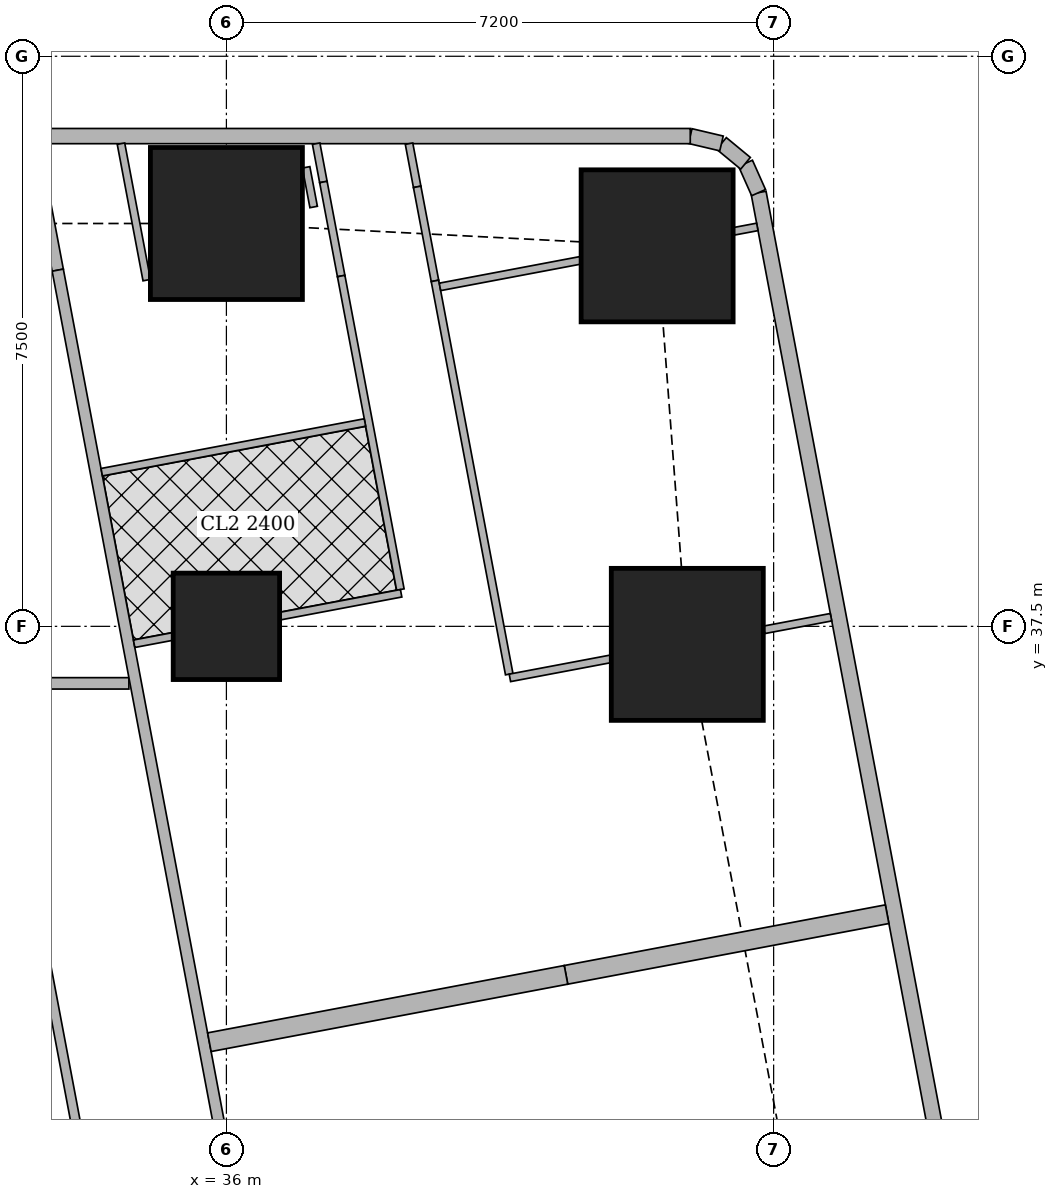
"""IFC4 building model, lengths in metres.
Left out: names, types, materials, properties, quantities, classifications, styles, units other than length and angle.
Written with IfcOpenShell. Run it as: python <this file> out.ifc"""

import sys

from ifc_helpers import new_model, si_unit, direction, frame, frame_2d, origin, origin_2d, place, context, subcontext, project, spatial, rectangle, extrude, element, fill, save


model = new_model("IFC4")
c1 = context("Model", 3, precision=1e-05, world=origin(), true_north=direction((0.0, 1.0)))
c2 = subcontext(c1, "Body", "Model", "MODEL_VIEW")
j1 = project(units=[si_unit("LENGTHUNIT", "METRE"), si_unit("PLANEANGLEUNIT", "RADIAN")], contexts=[c1])
p1 = place(None, origin())
s1 = spatial("IfcSite", under=j1, at=p1, CompositionType="ELEMENT")
p2 = place(p1, origin())
s2 = spatial("IfcBuilding", under=s1, at=p2, CompositionType="ELEMENT")
p3 = place(p2, frame((0.0, 0.0, 251.6)))
s3 = spatial("IfcBuildingStorey", under=s2, at=p3, CompositionType="ELEMENT", Elevation=251.6)
p4 = place(p3, frame((36.0, 37.5, 0.0), z_axis=(0.0, 0.0, 1.0), x_axis=(1.0, 0.0, 0.0)))
e1 = element("IfcColumn", 1, at=p4, inside=s3, PredefinedType="COLUMN", context=c2, shape_type="SweptSolid", body=[
    extrude(rectangle(XDim=1.4, YDim=1.4, at=origin_2d()), origin(), (0.0, 0.0, 1.0), 3.75),
])
p5 = place(p3, frame((42.064, 37.263, 0.0), z_axis=(0.0, 0.0, 1.0), x_axis=(1.0, 0.0, 0.0)))
e2 = element("IfcColumn", 2, at=p5, inside=s3, PredefinedType="COLUMN", context=c2, shape_type="SweptSolid", body=[
    extrude(rectangle(XDim=2.0, YDim=2.0, at=origin_2d()), origin(), (0.0, 0.0, 1.0), 3.75),
])
for number, where, z_axis, x_axis in (
    (3, (36.0, 42.8, -0.25), (0.0, 0.0, 1.0), (1.0, 0.0, 0.0)),
    (4, (41.667, 42.506, -0.25), (0.0, 0.0, 1.0), (1.0, 0.0, 0.0)),
):
    element("IfcColumn", number, at=place(p3, frame(where, z_axis=z_axis, x_axis=x_axis)), inside=s3, PredefinedType="COLUMN", context=c2, shape_type="SweptSolid", body=[
        extrude(rectangle(XDim=2.0, YDim=2.0, at=origin_2d()), origin(), (0.0, 0.0, 1.0), 4.0),
    ])
p6 = place(p3, frame((49.684, 7.832, 0.0), z_axis=(0.0, 0.0, 1.0), x_axis=(-0.185616669694, 0.982622232565, 0.0)))
e5 = element("IfcWall", 5, at=p6, inside=s3, PredefinedType="SOLIDWALL", context=c2, shape_type="SweptSolid", body=[
    extrude(rectangle(XDim=36.0, YDim=0.2, at=frame_2d((18.0, 0.0))), origin(), (0.0, 0.0, 1.0), 3.5),
])
p7 = place(p6, frame((2.518, 0.0, 0.9)))
e6 = element("IfcOpeningElement", 6, at=p7, cuts=e5, PredefinedType="OPENING", context=c2, shape_type="SweptSolid", body=[
    extrude(rectangle(XDim=2.4, YDim=1.5, at=frame_2d((1.2, 0.75))), frame((0.0, 0.11, 0.0), z_axis=(0.0, -1.0, 0.0), x_axis=(1.0, 0.0, 0.0)), (0.0, 0.0, 1.0), 0.22),
])
p8 = place(p6, frame((8.444, 0.0, 0.9)))
e7 = element("IfcOpeningElement", 7, at=p8, cuts=e5, PredefinedType="OPENING", context=c2, shape_type="SweptSolid", body=[
    extrude(rectangle(XDim=1.8, YDim=1.5, at=frame_2d((0.9, 0.75))), frame((0.0, 0.11, 0.0), z_axis=(0.0, -1.0, 0.0), x_axis=(1.0, 0.0, 0.0)), (0.0, 0.0, 1.0), 0.22),
])
p9 = place(p6, frame((12.261, 0.0, 0.9)))
e8 = element("IfcOpeningElement", 8, at=p9, cuts=e5, PredefinedType="OPENING", context=c2, shape_type="SweptSolid", body=[
    extrude(rectangle(XDim=1.8, YDim=1.5, at=frame_2d((0.9, 0.75))), frame((0.0, 0.11, 0.0), z_axis=(0.0, -1.0, 0.0), x_axis=(1.0, 0.0, 0.0)), (0.0, 0.0, 1.0), 0.22),
])
p10 = place(p6, frame((16.078, 0.0, 0.9)))
e9 = element("IfcOpeningElement", 9, at=p10, cuts=e5, PredefinedType="OPENING", context=c2, shape_type="SweptSolid", body=[
    extrude(rectangle(XDim=1.8, YDim=1.5, at=frame_2d((0.9, 0.75))), frame((0.0, 0.11, 0.0), z_axis=(0.0, -1.0, 0.0), x_axis=(1.0, 0.0, 0.0)), (0.0, 0.0, 1.0), 0.22),
])
p11 = place(p6, frame((19.894, 0.0, 0.9)))
e10 = element("IfcOpeningElement", 10, at=p11, cuts=e5, PredefinedType="OPENING", context=c2, shape_type="SweptSolid", body=[
    extrude(rectangle(XDim=1.8, YDim=1.5, at=frame_2d((0.9, 0.75))), frame((0.0, 0.11, 0.0), z_axis=(0.0, -1.0, 0.0), x_axis=(1.0, 0.0, 0.0)), (0.0, 0.0, 1.0), 0.22),
])
p12 = place(p6, frame((23.71, 0.0, 0.9)))
e11 = element("IfcOpeningElement", 11, at=p12, cuts=e5, PredefinedType="OPENING", context=c2, shape_type="SweptSolid", body=[
    extrude(rectangle(XDim=1.8, YDim=1.5, at=frame_2d((0.9, 0.75))), frame((0.0, 0.11, 0.0), z_axis=(0.0, -1.0, 0.0), x_axis=(1.0, 0.0, 0.0)), (0.0, 0.0, 1.0), 0.22),
])
p13 = place(p6, frame((27.526, 0.0, 0.9)))
e12 = element("IfcOpeningElement", 12, at=p13, cuts=e5, PredefinedType="OPENING", context=c2, shape_type="SweptSolid", body=[
    extrude(rectangle(XDim=1.8, YDim=1.5, at=frame_2d((0.9, 0.75))), frame((0.0, 0.11, 0.0), z_axis=(0.0, -1.0, 0.0), x_axis=(1.0, 0.0, 0.0)), (0.0, 0.0, 1.0), 0.22),
])
p14 = place(p6, frame((32.046, 0.0, 0.9)))
e13 = element("IfcOpeningElement", 13, at=p14, cuts=e5, PredefinedType="OPENING", context=c2, shape_type="SweptSolid", body=[
    extrude(rectangle(XDim=1.8, YDim=1.5, at=frame_2d((0.9, 0.75))), frame((0.0, 0.11, 0.0), z_axis=(0.0, -1.0, 0.0), x_axis=(1.0, 0.0, 0.0)), (0.0, 0.0, 1.0), 0.22),
])
p15 = place(p3, frame((43.002, 43.206, 0.0), z_axis=(0.0, 0.0, 1.0), x_axis=(-0.40678170573, 0.913525393124, 0.0)))
e14 = element("IfcWall", 14, at=p15, inside=s3, PredefinedType="SOLIDWALL", context=c2, shape_type="SweptSolid", body=[
    extrude(rectangle(XDim=0.423, YDim=0.2, at=frame_2d((0.211, 0.0))), origin(), (0.0, 0.0, 1.0), 3.5),
])
p16 = place(p3, frame((42.83, 43.592, 0.0), z_axis=(0.0, 0.0, 1.0), x_axis=(-0.771190539797, 0.636604391539, 0.0)))
e15 = element("IfcWall", 15, at=p16, inside=s3, PredefinedType="SOLIDWALL", context=c2, shape_type="SweptSolid", body=[
    extrude(rectangle(XDim=0.41, YDim=0.2, at=frame_2d((0.205, 0.0))), origin(), (0.0, 0.0, 1.0), 3.5),
])
p17 = place(p3, frame((42.514, 43.853, 0.0), z_axis=(0.0, 0.0, 1.0), x_axis=(-0.973288080424, 0.229587265555, 0.0)))
e16 = element("IfcWall", 16, at=p17, inside=s3, PredefinedType="SOLIDWALL", context=c2, shape_type="SweptSolid", body=[
    extrude(rectangle(XDim=0.422, YDim=0.2, at=frame_2d((0.211, 0.0))), origin(), (0.0, 0.0, 1.0), 3.5),
])
p18 = place(p3, frame((42.103, 43.95, 0.0), z_axis=(0.0, 0.0, 1.0), x_axis=(-1.0, 0.0, 0.0)))
e17 = element("IfcWall", 17, at=p18, inside=s3, PredefinedType="SOLIDWALL", context=c2, shape_type="SweptSolid", body=[
    extrude(rectangle(XDim=27.54, YDim=0.2, at=frame_2d((13.77, 0.0))), origin(), (0.0, 0.0, 1.0), 3.5),
])
p19 = place(p18, frame((10.603, 0.0, 0.9)))
e18 = element("IfcOpeningElement", 18, at=p19, cuts=e17, PredefinedType="OPENING", context=c2, shape_type="SweptSolid", body=[
    extrude(rectangle(XDim=1.8, YDim=1.5, at=frame_2d((0.9, 0.75))), frame((0.0, 0.11, 0.0), z_axis=(0.0, -1.0, 0.0), x_axis=(1.0, 0.0, 0.0)), (0.0, 0.0, 1.0), 0.22),
])
p20 = place(p18, frame((14.203, 0.0, 0.9)))
e19 = element("IfcOpeningElement", 19, at=p20, cuts=e17, PredefinedType="OPENING", context=c2, shape_type="SweptSolid", body=[
    extrude(rectangle(XDim=1.8, YDim=1.5, at=frame_2d((0.9, 0.75))), frame((0.0, 0.11, 0.0), z_axis=(0.0, -1.0, 0.0), x_axis=(1.0, 0.0, 0.0)), (0.0, 0.0, 1.0), 0.22),
])
p21 = place(p18, frame((17.803, 0.0, 0.9)))
e20 = element("IfcOpeningElement", 20, at=p21, cuts=e17, PredefinedType="OPENING", context=c2, shape_type="SweptSolid", body=[
    extrude(rectangle(XDim=1.8, YDim=1.5, at=frame_2d((0.9, 0.75))), frame((0.0, 0.11, 0.0), z_axis=(0.0, -1.0, 0.0), x_axis=(1.0, 0.0, 0.0)), (0.0, 0.0, 1.0), 0.22),
])
p22 = place(p18, frame((22.822, 0.0, 0.9)))
e21 = element("IfcOpeningElement", 21, at=p22, cuts=e17, PredefinedType="OPENING", context=c2, shape_type="SweptSolid", body=[
    extrude(rectangle(XDim=2.4, YDim=1.5, at=frame_2d((1.2, 0.75))), frame((0.0, 0.11, 0.0), z_axis=(0.0, -1.0, 0.0), x_axis=(1.0, 0.0, 0.0)), (0.0, 0.0, 1.0), 0.22),
])
p23 = place(p3, frame((29.501, 36.75, 0.0), z_axis=(0.0, 0.0, 1.0), x_axis=(1.0, 0.0, 0.0)))
e22 = element("IfcWall", 22, at=p23, inside=s3, PredefinedType="SOLIDWALL", context=c2, shape_type="SweptSolid", body=[
    extrude(rectangle(XDim=5.216, YDim=0.15, at=frame_2d((2.608, 0.0))), origin(), (0.0, 0.0, 1.0), 3.5),
])
p24 = place(p23, frame((1.803, 0.0, 0.0)))
e23 = element("IfcOpeningElement", 23, at=p24, cuts=e22, PredefinedType="OPENING", context=c2, shape_type="SweptSolid", body=[
    extrude(rectangle(XDim=1.0, YDim=2.1, at=frame_2d((0.5, 1.05))), frame((0.0, 0.085, 0.0), z_axis=(0.0, -1.0, 0.0), x_axis=(1.0, 0.0, 0.0)), (0.0, 0.0, 1.0), 0.17),
])
p25 = place(p3, frame((33.549, 43.414, 0.0), z_axis=(0.0, 0.0, 1.0), x_axis=(0.185585816539, -0.982628060204, 0.0)))
e24 = element("IfcWall", 24, at=p25, inside=s3, PredefinedType="SOLIDWALL", context=c2, shape_type="SweptSolid", body=[
    extrude(rectangle(XDim=1.25, YDim=0.15, at=frame_2d((0.625, 0.0))), origin(), (0.0, 0.0, 1.0), 2.05),
])
p26 = place(p3, frame((33.781, 42.186, 0.0), z_axis=(0.0, 0.0, 1.0), x_axis=(0.185593518645, -0.9826266055, 0.0)))
e25 = element("IfcWall", 25, at=p26, inside=s3, PredefinedType="SOLIDWALL", context=c2, shape_type="SweptSolid", body=[
    extrude(rectangle(XDim=35.961, YDim=0.15, at=frame_2d((17.98, 0.0))), origin(), (0.0, 0.0, 1.0), 2.5),
])
p27 = place(p26, frame((7.183, 0.0, 0.0)))
e26 = element("IfcOpeningElement", 26, at=p27, cuts=e25, PredefinedType="OPENING", context=c2, shape_type="SweptSolid", body=[
    extrude(rectangle(XDim=1.0, YDim=2.1, at=frame_2d((0.5, 1.05))), frame((0.0, 0.085, 0.0), z_axis=(0.0, -1.0, 0.0), x_axis=(1.0, 0.0, 0.0)), (0.0, 0.0, 1.0), 0.17),
])
p28 = place(p26, frame((11.76, 0.0, 0.0)))
e27 = element("IfcOpeningElement", 27, at=p28, cuts=e25, PredefinedType="OPENING", context=c2, shape_type="SweptSolid", body=[
    extrude(rectangle(XDim=1.0, YDim=2.1, at=frame_2d((0.5, 1.05))), frame((0.0, 0.085, 0.0), z_axis=(0.0, -1.0, 0.0), x_axis=(1.0, 0.0, 0.0)), (0.0, 0.0, 1.0), 0.17),
])
p29 = place(p26, frame((23.863, 0.0, 0.0)))
e28 = element("IfcOpeningElement", 28, at=p29, cuts=e25, PredefinedType="OPENING", context=c2, shape_type="SweptSolid", body=[
    extrude(rectangle(XDim=1.0, YDim=2.1, at=frame_2d((0.5, 1.05))), frame((0.0, 0.085, 0.0), z_axis=(0.0, -1.0, 0.0), x_axis=(1.0, 0.0, 0.0)), (0.0, 0.0, 1.0), 0.17),
])
p30 = place(p26, frame((30.502, 0.0, 0.0)))
e29 = element("IfcOpeningElement", 29, at=p30, cuts=e25, PredefinedType="OPENING", context=c2, shape_type="SweptSolid", body=[
    extrude(rectangle(XDim=1.0, YDim=2.1, at=frame_2d((0.5, 1.05))), frame((0.0, 0.085, 0.0), z_axis=(0.0, -1.0, 0.0), x_axis=(1.0, 0.0, 0.0)), (0.0, 0.0, 1.0), 0.17),
])
p31 = place(p3, frame((34.952, 42.055, 0.0), z_axis=(0.0, 0.0, 1.0), x_axis=(-0.185490642006, 0.98264603074, 0.0)))
e30 = element("IfcWall", 30, at=p31, inside=s3, PredefinedType="PARTITIONING", context=c2, shape_type="SweptSolid", body=[
    extrude(rectangle(XDim=1.827, YDim=0.1, at=frame_2d((0.914, 0.0))), origin(), (0.0, 0.0, 1.0), 2.05),
])
p32 = place(p3, frame((37.049, 43.539, 0.0), z_axis=(0.0, 0.0, 1.0), x_axis=(0.186119495745, -0.982527115811, 0.0)))
e31 = element("IfcWall", 31, at=p32, inside=s3, PredefinedType="PARTITIONING", context=c2, shape_type="SweptSolid", body=[
    extrude(rectangle(XDim=0.531, YDim=0.1, at=frame_2d((0.266, 0.0))), origin(), (0.0, 0.0, 1.0), 2.05),
])
p33 = place(p3, frame((38.403, 43.85, 0.0), z_axis=(0.0, 0.0, 1.0), x_axis=(0.184976954078, -0.982742858768, 0.0)))
e32 = element("IfcWall", 32, at=p33, inside=s3, PredefinedType="PARTITIONING", context=c2, shape_type="SweptSolid", body=[
    extrude(rectangle(XDim=0.578, YDim=0.1, at=frame_2d((0.289, 0.0))), origin(), (0.0, 0.0, 1.0), 3.5),
])
p34 = place(p3, frame((38.51, 43.282, 0.0), z_axis=(0.0, 0.0, 1.0), x_axis=(0.185775287495, -0.982592256511, 0.0)))
e33 = element("IfcWall", 33, at=p34, inside=s3, PredefinedType="PARTITIONING", context=c2, shape_type="SweptSolid", body=[
    extrude(rectangle(XDim=1.259, YDim=0.1, at=frame_2d((0.629, 0.0))), origin(), (0.0, 0.0, 1.0), 2.05),
])
p35 = place(p34, frame((0.15, 0.0, 0.0)))
e34 = element("IfcOpeningElement", 34, at=p35, cuts=e33, PredefinedType="OPENING", context=c2, shape_type="SweptSolid", body=[
    extrude(rectangle(XDim=0.9, YDim=2.0, at=frame_2d((0.45, 1.0))), frame((0.0, 0.06, 0.0), z_axis=(0.0, -1.0, 0.0), x_axis=(1.0, 0.0, 0.0)), (0.0, 0.0, 1.0), 0.12),
])
p36 = place(p3, frame((38.744, 42.045, 0.0), z_axis=(0.0, 0.0, 1.0), x_axis=(0.185564988614, -0.982631993679, 0.0)))
e35 = element("IfcWall", 35, at=p36, inside=s3, PredefinedType="PARTITIONING", context=c2, shape_type="SweptSolid", body=[
    extrude(rectangle(XDim=5.265, YDim=0.1, at=frame_2d((2.633, 0.0))), origin(), (0.0, 0.0, 1.0), 3.5),
])
p37 = place(p36, frame((2.856, 0.0, 0.0)))
e36 = element("IfcOpeningElement", 36, at=p37, cuts=e35, PredefinedType="OPENING", context=c2, shape_type="SweptSolid", body=[
    extrude(rectangle(XDim=0.9, YDim=2.1, at=frame_2d((0.45, 1.05))), frame((0.0, 0.06, 0.0), z_axis=(0.0, -1.0, 0.0), x_axis=(1.0, 0.0, 0.0)), (0.0, 0.0, 1.0), 0.12),
])
p38 = place(p3, frame((37.181, 43.85, 0.0), z_axis=(0.0, 0.0, 1.0), x_axis=(0.185121727606, -0.982715597703, 0.0)))
e37 = element("IfcWall", 37, at=p38, inside=s3, PredefinedType="PARTITIONING", context=c2, shape_type="SweptSolid", body=[
    extrude(rectangle(XDim=0.513, YDim=0.1, at=frame_2d((0.256, 0.0))), origin(), (0.0, 0.0, 1.0), 3.5),
])
p39 = place(p3, frame((37.276, 43.346, 0.0), z_axis=(0.0, 0.0, 1.0), x_axis=(0.185962504646, -0.982556841544, 0.0)))
e38 = element("IfcWall", 38, at=p39, inside=s3, PredefinedType="PARTITIONING", context=c2, shape_type="SweptSolid", body=[
    extrude(rectangle(XDim=1.259, YDim=0.1, at=frame_2d((0.629, 0.0))), origin(), (0.0, 0.0, 1.0), 2.05),
])
p40 = place(p3, frame((37.51, 42.109, 0.0), z_axis=(0.0, 0.0, 1.0), x_axis=(0.185580569503, -0.98262905118, 0.0)))
e39 = element("IfcWall", 39, at=p40, inside=s3, PredefinedType="PARTITIONING", context=c2, shape_type="SweptSolid", body=[
    extrude(rectangle(XDim=4.198, YDim=0.1, at=frame_2d((2.099, 0.0))), origin(), (0.0, 0.0, 1.0), 3.5),
])
p41 = place(p40, frame((2.65, 0.0, 0.0)))
e40 = element("IfcOpeningElement", 40, at=p41, cuts=e39, PredefinedType="OPENING", context=c2, shape_type="SweptSolid", body=[
    extrude(rectangle(XDim=0.9, YDim=2.1, at=frame_2d((0.45, 1.05))), frame((0.0, 0.06, 0.0), z_axis=(0.0, -1.0, 0.0), x_axis=(1.0, 0.0, 0.0)), (0.0, 0.0, 1.0), 0.12),
])
p42 = place(p3, frame((42.985, 42.755, 0.0), z_axis=(0.0, 0.0, 1.0), x_axis=(-0.98281924824, -0.184570651215, 0.0)))
e41 = element("IfcWall", 41, at=p42, inside=s3, PredefinedType="PARTITIONING", context=c2, shape_type="SweptSolid", body=[
    extrude(rectangle(XDim=0.313, YDim=0.1, at=frame_2d((0.157, 0.0))), origin(), (0.0, 0.0, 1.0), 3.5),
])
p43 = place(p3, frame((40.657, 42.315, 0.0), z_axis=(0.0, 0.0, 1.0), x_axis=(-0.982622785543, -0.185613742305, 0.0)))
e42 = element("IfcWall", 42, at=p43, inside=s3, PredefinedType="PARTITIONING", context=c2, shape_type="SweptSolid", body=[
    extrude(rectangle(XDim=1.88, YDim=0.1, at=frame_2d((0.94, 0.0))), origin(), (0.0, 0.0, 1.0), 2.05),
])
p44 = place(p3, frame((43.955, 37.62, 0.0), z_axis=(0.0, 0.0, 1.0), x_axis=(-0.982708424405, -0.18515980288, 0.0)))
e43 = element("IfcWall", 43, at=p44, inside=s3, PredefinedType="PARTITIONING", context=c2, shape_type="SweptSolid", body=[
    extrude(rectangle(XDim=0.897, YDim=0.1, at=frame_2d((0.448, 0.0))), origin(), (0.0, 0.0, 1.0), 3.5),
])
p45 = place(p3, frame((41.054, 37.072, 0.0), z_axis=(0.0, 0.0, 1.0), x_axis=(-0.982635482721, -0.18554651195, 0.0)))
e44 = element("IfcWall", 44, at=p45, inside=s3, PredefinedType="PARTITIONING", context=c2, shape_type="SweptSolid", body=[
    extrude(rectangle(XDim=1.347, YDim=0.1, at=frame_2d((0.674, 0.0))), origin(), (0.0, 0.0, 1.0), 3.5),
])
p46 = place(p3, frame((37.823, 40.182, 0.0), z_axis=(0.0, 0.0, 1.0), x_axis=(-0.98263926043, -0.185526504472, 0.0)))
e45 = element("IfcWall", 45, at=p46, inside=s3, PredefinedType="PARTITIONING", context=c2, shape_type="SweptSolid", body=[
    extrude(rectangle(XDim=3.524, YDim=0.1, at=frame_2d((1.762, 0.0))), origin(), (0.0, 0.0, 1.0), 3.5),
])
p47 = place(p3, frame((38.299, 37.935, 0.0), z_axis=(0.0, 0.0, 1.0), x_axis=(-0.98263725405, -0.185537130931, 0.0)))
e46 = element("IfcWall", 46, at=p47, inside=s3, PredefinedType="PARTITIONING", context=c2, shape_type="SweptSolid", body=[
    extrude(rectangle(XDim=1.617, YDim=0.1, at=frame_2d((0.809, 0.0))), origin(), (0.0, 0.0, 1.0), 3.5),
])
p48 = place(p3, frame((35.29, 37.366, 0.0), z_axis=(0.0, 0.0, 1.0), x_axis=(-0.982715597703, -0.185121727606, 0.0)))
e47 = element("IfcWall", 47, at=p48, inside=s3, PredefinedType="PARTITIONING", context=c2, shape_type="SweptSolid", body=[
    extrude(rectangle(XDim=0.513, YDim=0.1, at=frame_2d((0.256, 0.0))), origin(), (0.0, 0.0, 1.0), 3.5),
])
p49 = place(p3, frame((44.693, 33.713, 0.0), z_axis=(0.0, 0.0, 1.0), x_axis=(-0.982633535512, -0.185556823879, 0.0)))
e48 = element("IfcWall", 48, at=p49, inside=s3, PredefinedType="SOLIDWALL", context=c2, shape_type="SweptSolid", body=[
    extrude(rectangle(XDim=4.3, YDim=0.25, at=frame_2d((2.15, 0.0))), origin(), (0.0, 0.0, 1.0), 2.5),
])
p50 = place(p3, frame((40.468, 32.915, 0.0), z_axis=(0.0, 0.0, 1.0), x_axis=(-0.982635807605, -0.185544791394, 0.0)))
e49 = element("IfcWall", 49, at=p50, inside=s3, PredefinedType="SOLIDWALL", context=c2, shape_type="SweptSolid", body=[
    extrude(rectangle(XDim=4.775, YDim=0.25, at=frame_2d((2.388, 0.0))), origin(), (0.0, 0.0, 1.0), 3.5),
])
p51 = place(p3, frame((34.193, 30.04, 0.0), z_axis=(0.0, 0.0, 1.0), x_axis=(-0.185556349615, 0.98263362507, 0.0)))
e50 = element("IfcWall", 50, at=p51, inside=s3, PredefinedType="PARTITIONING", context=c2, shape_type="SweptSolid", body=[
    extrude(rectangle(XDim=4.883, YDim=0.125, at=frame_2d((2.441, 0.0))), origin(), (0.0, 0.0, 1.0), 2.5),
])
p52 = place(p51, frame((0.95, 0.0, 0.0)))
e51 = element("IfcOpeningElement", 51, at=p52, cuts=e50, PredefinedType="OPENING", context=c2, shape_type="SweptSolid", body=[
    extrude(rectangle(XDim=1.0, YDim=2.1, at=frame_2d((0.5, 1.05))), frame((0.0, 0.073, 0.0), z_axis=(0.0, -1.0, 0.0), x_axis=(1.0, 0.0, 0.0)), (0.0, 0.0, 1.0), 0.145),
])
p53 = place(p12, origin())
e52 = element("IfcWindow", 52, at=p53, inside=s3, PartitioningType="SINGLE_PANEL", PredefinedType="WINDOW", context=c2, shape_type="SweptSolid", body=[
    extrude(rectangle(XDim=1.8, YDim=1.5, at=frame_2d((0.9, 0.75))), frame((0.0, 0.03, 0.0), z_axis=(0.0, -1.0, 0.0), x_axis=(1.0, 0.0, 0.0)), (0.0, 0.0, 1.0), 0.06),
])
fill(e11, e52)
p54 = place(p13, origin())
e53 = element("IfcWindow", 53, at=p54, inside=s3, PartitioningType="SINGLE_PANEL", PredefinedType="WINDOW", context=c2, shape_type="SweptSolid", body=[
    extrude(rectangle(XDim=1.8, YDim=1.5, at=frame_2d((0.9, 0.75))), frame((0.0, 0.03, 0.0), z_axis=(0.0, -1.0, 0.0), x_axis=(1.0, 0.0, 0.0)), (0.0, 0.0, 1.0), 0.06),
])
fill(e12, e53)
p55 = place(p14, origin())
e54 = element("IfcWindow", 54, at=p55, inside=s3, PartitioningType="SINGLE_PANEL", PredefinedType="WINDOW", context=c2, shape_type="SweptSolid", body=[
    extrude(rectangle(XDim=1.8, YDim=1.5, at=frame_2d((0.9, 0.75))), frame((0.0, 0.03, 0.0), z_axis=(0.0, -1.0, 0.0), x_axis=(1.0, 0.0, 0.0)), (0.0, 0.0, 1.0), 0.06),
])
fill(e13, e54)
p56 = place(p35, origin())
e55 = element("IfcDoor", 55, at=p56, inside=s3, OperationType="SINGLE_SWING_LEFT", PredefinedType="DOOR", context=c2, shape_type="SweptSolid", body=[
    extrude(rectangle(XDim=0.9, YDim=2.0, at=frame_2d((0.45, 1.0))), frame((0.0, 0.025, 0.0), z_axis=(0.0, -1.0, 0.0), x_axis=(1.0, 0.0, 0.0)), (0.0, 0.0, 1.0), 0.05),
])
fill(e34, e55)
p57 = place(p37, origin())
e56 = element("IfcDoor", 56, at=p57, inside=s3, OperationType="SINGLE_SWING_RIGHT", PredefinedType="DOOR", context=c2, shape_type="SweptSolid", body=[
    extrude(rectangle(XDim=0.9, YDim=2.1, at=frame_2d((0.45, 1.05))), frame((0.0, 0.025, 0.0), z_axis=(0.0, -1.0, 0.0), x_axis=(1.0, 0.0, 0.0)), (0.0, 0.0, 1.0), 0.05),
])
fill(e36, e56)
p58 = place(p41, origin())
e57 = element("IfcDoor", 57, at=p58, inside=s3, OperationType="SINGLE_SWING_LEFT", PredefinedType="DOOR", context=c2, shape_type="SweptSolid", body=[
    extrude(rectangle(XDim=0.9, YDim=2.1, at=frame_2d((0.45, 1.05))), frame((0.0, 0.025, 0.0), z_axis=(0.0, -1.0, 0.0), x_axis=(1.0, 0.0, 0.0)), (0.0, 0.0, 1.0), 0.05),
])
fill(e40, e57)
p59 = place(p27, origin())
e58 = element("IfcDoor", 58, at=p59, inside=s3, OperationType="SINGLE_SWING_RIGHT", PredefinedType="DOOR", context=c2, shape_type="SweptSolid", body=[
    extrude(rectangle(XDim=1.0, YDim=2.1, at=frame_2d((0.5, 1.05))), frame((0.0, 0.025, 0.0), z_axis=(0.0, -1.0, 0.0), x_axis=(1.0, 0.0, 0.0)), (0.0, 0.0, 1.0), 0.05),
])
fill(e26, e58)
p60 = place(p52, origin())
e59 = element("IfcDoor", 59, at=p60, inside=s3, OperationType="SINGLE_SWING_LEFT", PredefinedType="DOOR", context=c2, shape_type="SweptSolid", body=[
    extrude(rectangle(XDim=1.0, YDim=2.1, at=frame_2d((0.5, 1.05))), frame((0.0, 0.025, 0.0), z_axis=(0.0, -1.0, 0.0), x_axis=(1.0, 0.0, 0.0)), (0.0, 0.0, 1.0), 0.05),
])
fill(e51, e59)
save(model, sys.argv[1])
